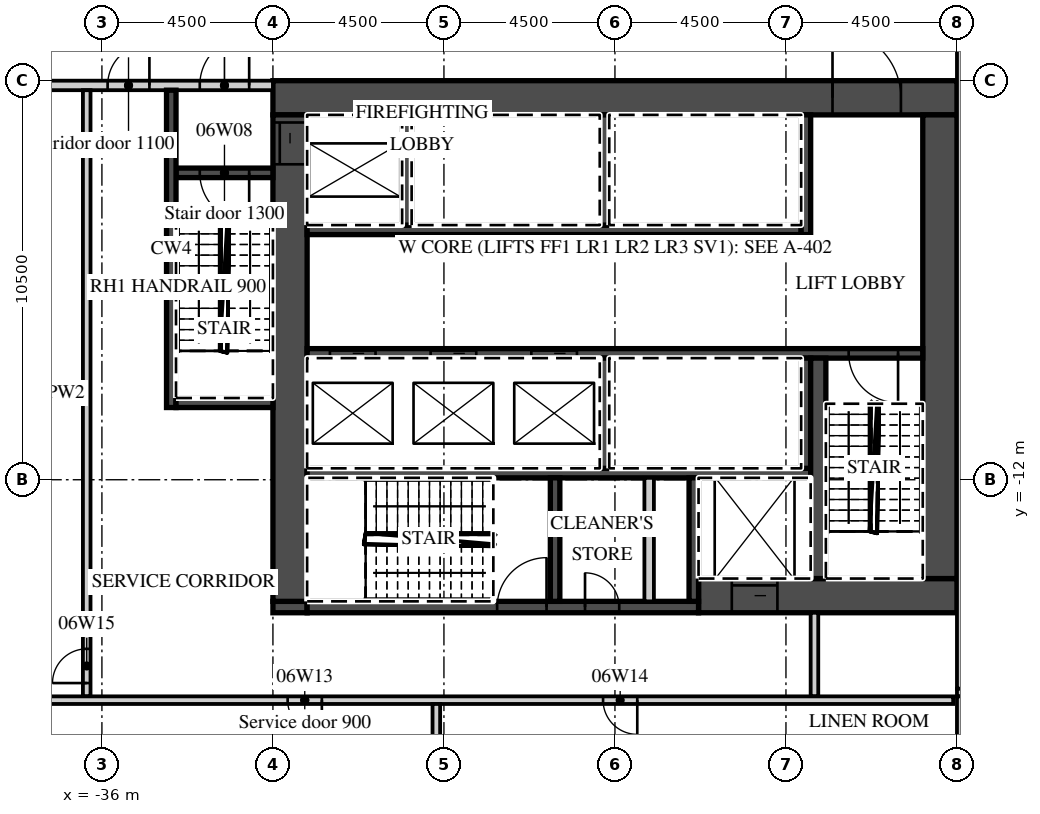
"""IFC4 building model, lengths in metres.
Left out: names, types, materials, properties, quantities, classifications, styles, units other than length and angle.
Written with IfcOpenShell. Run it as: python <this file> out.ifc"""

import sys

from ifc_helpers import new_model, si_unit, direction, frame, frame_2d, origin, place, context, subcontext, project, spatial, rectangle, extrude, element, fill, save


model = new_model("IFC4")
c1 = context("Model", 3, precision=1e-05, world=origin(), true_north=direction((0.0, 1.0)))
c2 = subcontext(c1, "Body", "Model", "MODEL_VIEW")
j1 = project(units=[si_unit("LENGTHUNIT", "METRE"), si_unit("PLANEANGLEUNIT", "RADIAN")], contexts=[c1])
p1 = place(None, origin())
s1 = spatial("IfcSite", under=j1, at=p1, CompositionType="ELEMENT")
p2 = place(p1, origin())
s2 = spatial("IfcBuilding", under=s1, at=p2, CompositionType="ELEMENT")
p3 = place(p2, frame((0.0, 0.0, 38.0)))
s3 = spatial("IfcBuildingStorey", under=s2, at=p3, CompositionType="ELEMENT", Elevation=38.0)
p4 = place(p3, frame((-31.5, -1.95, 0.0), z_axis=(0.0, 0.0, 1.0), x_axis=(1.0, 0.0, 0.0)))
e1 = element("IfcWall", 1, at=p4, inside=s3, PredefinedType="SHEAR", context=c2, shape_type="SweptSolid", body=[
    extrude(rectangle(XDim=18.0, YDim=0.9, at=frame_2d((9.0, 0.0))), origin(), (0.0, 0.0, 1.0), 8.7),
])
p5 = place(p4, frame((14.725, 0.0, 0.0)))
e2 = element("IfcOpeningElement", 2, at=p5, cuts=e1, PredefinedType="OPENING", context=c2, shape_type="SweptSolid", body=[
    extrude(rectangle(XDim=1.8, YDim=2.1, at=frame_2d((0.9, 1.05))), frame((0.0, 0.46, 0.0), z_axis=(0.0, -1.0, 0.0), x_axis=(1.0, 0.0, 0.0)), (0.0, 0.0, 1.0), 0.92),
])
p6 = place(p3, frame((-20.3, -15.05, 0.0), z_axis=(0.0, 0.0, 1.0), x_axis=(1.0, 0.0, 0.0)))
e3 = element("IfcWall", 3, at=p6, inside=s3, PredefinedType="SHEAR", context=c2, shape_type="SweptSolid", body=[
    extrude(rectangle(XDim=6.8, YDim=0.9, at=frame_2d((3.4, 0.0))), origin(), (0.0, 0.0, 1.0), 8.7),
])
p7 = place(p6, frame((0.875, 0.0, 0.0)))
e4 = element("IfcOpeningElement", 4, at=p7, cuts=e3, PredefinedType="OPENING", context=c2, shape_type="SweptSolid", body=[
    extrude(rectangle(XDim=1.2, YDim=2.1, at=frame_2d((0.6, 1.05))), frame((0.0, 0.46, 0.0), z_axis=(0.0, -1.0, 0.0), x_axis=(1.0, 0.0, 0.0)), (0.0, 0.0, 1.0), 0.92),
])
p8 = place(p3, frame((-31.5, -15.35, 0.0), z_axis=(0.0, 0.0, 1.0), x_axis=(1.0, 0.0, 0.0)))
e5 = element("IfcWall", 5, at=p8, inside=s3, PredefinedType="SHEAR", context=c2, shape_type="SweptSolid", body=[
    extrude(rectangle(XDim=0.9, YDim=0.3, at=frame_2d((0.45, 0.0))), origin(), (0.0, 0.0, 1.0), 8.7),
])
p9 = place(p3, frame((-30.6, -15.35, 0.0), z_axis=(0.0, 0.0, 1.0), x_axis=(1.0, 0.0, 0.0)))
e6 = element("IfcWall", 6, at=p9, inside=s3, PredefinedType="SHEAR", context=c2, shape_type="SweptSolid", body=[
    extrude(rectangle(XDim=10.3, YDim=0.3, at=frame_2d((5.15, 0.0))), origin(), (0.0, 0.0, 1.0), 8.7),
])
p10 = place(p9, frame((5.0, 0.0, 0.0)))
e7 = element("IfcOpeningElement", 7, at=p10, cuts=e6, PredefinedType="OPENING", context=c2, shape_type="SweptSolid", body=[
    extrude(rectangle(XDim=1.3, YDim=2.1, at=frame_2d((0.65, 1.05))), frame((0.0, 0.16, 0.0), z_axis=(0.0, -1.0, 0.0), x_axis=(1.0, 0.0, 0.0)), (0.0, 0.0, 1.0), 0.32),
])
p11 = place(p9, frame((7.312, 0.0, 0.0)))
e8 = element("IfcOpeningElement", 8, at=p11, cuts=e6, PredefinedType="OPENING", context=c2, shape_type="SweptSolid", body=[
    extrude(rectangle(XDim=0.9, YDim=2.1, at=frame_2d((0.45, 1.05))), frame((0.0, 0.16, 0.0), z_axis=(0.0, -1.0, 0.0), x_axis=(1.0, 0.0, 0.0)), (0.0, 0.0, 1.0), 0.32),
])
p12 = place(p3, frame((-31.05, -15.2, 0.0), z_axis=(0.0, 0.0, 1.0), x_axis=(0.0, 1.0, 0.0)))
e9 = element("IfcWall", 9, at=p12, inside=s3, PredefinedType="SHEAR", context=c2, shape_type="SweptSolid", body=[
    extrude(rectangle(XDim=12.8, YDim=0.9, at=frame_2d((6.4, 0.0))), origin(), (0.0, 0.0, 1.0), 8.7),
])
p13 = place(p12, frame((11.5, 0.0, 0.0)))
e10 = element("IfcOpeningElement", 10, at=p13, cuts=e9, PredefinedType="OPENING", context=c2, shape_type="SweptSolid", body=[
    extrude(rectangle(XDim=1.1, YDim=2.1, at=frame_2d((0.55, 1.05))), frame((0.0, 0.46, 0.0), z_axis=(0.0, -1.0, 0.0), x_axis=(1.0, 0.0, 0.0)), (0.0, 0.0, 1.0), 0.92),
])
p14 = place(p3, frame((-13.95, -14.6, 0.0), z_axis=(0.0, 0.0, 1.0), x_axis=(0.0, 1.0, 0.0)))
e11 = element("IfcWall", 11, at=p14, inside=s3, PredefinedType="SHEAR", context=c2, shape_type="SweptSolid", body=[
    extrude(rectangle(XDim=12.2, YDim=0.9, at=frame_2d((6.1, 0.0))), origin(), (0.0, 0.0, 1.0), 8.7),
])
p15 = place(p3, frame((-30.6, -5.425, 0.0), z_axis=(0.0, 0.0, 1.0), x_axis=(1.0, 0.0, 0.0)))
e12 = element("IfcWall", 12, at=p15, inside=s3, PredefinedType="SHEAR", context=c2, shape_type="SweptSolid", body=[
    extrude(rectangle(XDim=13.0, YDim=0.25, at=frame_2d((6.5, 0.0))), origin(), (0.0, 0.0, 1.0), 8.7),
])
p16 = place(p3, frame((-17.475, -5.55, 0.0), z_axis=(0.0, 0.0, 1.0), x_axis=(0.0, 1.0, 0.0)))
e13 = element("IfcWall", 13, at=p16, inside=s3, PredefinedType="SHEAR", context=c2, shape_type="SweptSolid", body=[
    extrude(rectangle(XDim=3.15, YDim=0.25, at=frame_2d((1.575, 0.0))), origin(), (0.0, 0.0, 1.0), 8.7),
])
for number, where, z_axis, x_axis in (
    (14, (-27.975, -5.3, 0.0), (0.0, 0.0, 1.0), (0.0, 1.0, 0.0)),
    (15, (-22.775, -5.3, 0.0), (0.0, 0.0, 1.0), (0.0, 1.0, 0.0)),
):
    element("IfcWall", number, at=place(p3, frame(where, z_axis=z_axis, x_axis=x_axis)), inside=s3, PredefinedType="SHEAR", context=c2, shape_type="SweptSolid", body=[
        extrude(rectangle(XDim=2.9, YDim=0.25, at=frame_2d((1.45, 0.0))), origin(), (0.0, 0.0, 1.0), 8.7),
    ])
p17 = place(p3, frame((-30.6, -8.675, 0.0), z_axis=(0.0, 0.0, 1.0), x_axis=(1.0, 0.0, 0.0)))
e16 = element("IfcWall", 16, at=p17, inside=s3, PredefinedType="SHEAR", context=c2, shape_type="SweptSolid", body=[
    extrude(rectangle(XDim=16.2, YDim=0.25, at=frame_2d((8.1, 0.0))), origin(), (0.0, 0.0, 1.0), 8.7),
])
p18 = place(p17, frame((0.6, 0.0, 0.0)))
e17 = element("IfcOpeningElement", 17, at=p18, cuts=e16, PredefinedType="OPENING", context=c2, shape_type="SweptSolid", body=[
    extrude(rectangle(XDim=1.2, YDim=2.1, at=frame_2d((0.6, 1.05))), frame((0.0, 0.135, 0.0), z_axis=(0.0, -1.0, 0.0), x_axis=(1.0, 0.0, 0.0)), (0.0, 0.0, 1.0), 0.27),
])
p19 = place(p17, frame((3.25, 0.0, 0.0)))
e18 = element("IfcOpeningElement", 18, at=p19, cuts=e16, PredefinedType="OPENING", context=c2, shape_type="SweptSolid", body=[
    extrude(rectangle(XDim=1.2, YDim=2.1, at=frame_2d((0.6, 1.05))), frame((0.0, 0.135, 0.0), z_axis=(0.0, -1.0, 0.0), x_axis=(1.0, 0.0, 0.0)), (0.0, 0.0, 1.0), 0.27),
])
p20 = place(p17, frame((5.9, 0.0, 0.0)))
e19 = element("IfcOpeningElement", 19, at=p20, cuts=e16, PredefinedType="OPENING", context=c2, shape_type="SweptSolid", body=[
    extrude(rectangle(XDim=1.2, YDim=2.1, at=frame_2d((0.6, 1.05))), frame((0.0, 0.135, 0.0), z_axis=(0.0, -1.0, 0.0), x_axis=(1.0, 0.0, 0.0)), (0.0, 0.0, 1.0), 0.27),
])
p21 = place(p17, frame((14.25, 0.0, 0.0)))
e20 = element("IfcOpeningElement", 20, at=p21, cuts=e16, PredefinedType="OPENING", context=c2, shape_type="SweptSolid", body=[
    extrude(rectangle(XDim=1.3, YDim=2.1, at=frame_2d((0.65, 1.05))), frame((0.0, 0.135, 0.0), z_axis=(0.0, -1.0, 0.0), x_axis=(1.0, 0.0, 0.0)), (0.0, 0.0, 1.0), 0.27),
])
p22 = place(p3, frame((-30.6, -11.825, 0.0), z_axis=(0.0, 0.0, 1.0), x_axis=(1.0, 0.0, 0.0)))
e21 = element("IfcWall", 21, at=p22, inside=s3, PredefinedType="SHEAR", context=c2, shape_type="SweptSolid", body=[
    extrude(rectangle(XDim=13.25, YDim=0.25, at=frame_2d((6.625, 0.0))), origin(), (0.0, 0.0, 1.0), 8.7),
])
for number, where, z_axis, x_axis in (
    (22, (-17.475, -11.7, 0.0), (0.0, 0.0, 1.0), (0.0, 1.0, 0.0)),
    (23, (-22.775, -11.7, 0.0), (0.0, 0.0, 1.0), (0.0, 1.0, 0.0)),
):
    element("IfcWall", number, at=place(p3, frame(where, z_axis=z_axis, x_axis=x_axis)), inside=s3, PredefinedType="SHEAR", context=c2, shape_type="SweptSolid", body=[
        extrude(rectangle(XDim=2.9, YDim=0.25, at=frame_2d((1.45, 0.0))), origin(), (0.0, 0.0, 1.0), 8.7),
    ])
p23 = place(p3, frame((-17.15, -14.6, 0.0), z_axis=(0.0, 0.0, 1.0), x_axis=(0.0, 1.0, 0.0)))
e24 = element("IfcWall", 24, at=p23, inside=s3, PredefinedType="SHEAR", context=c2, shape_type="SweptSolid", body=[
    extrude(rectangle(XDim=5.8, YDim=0.4, at=frame_2d((2.9, 0.0))), origin(), (0.0, 0.0, 1.0), 8.7),
])
for number, where, z_axis, x_axis in (
    (25, (-20.425, -15.2, 0.0), (0.0, 0.0, 1.0), (0.0, 1.0, 0.0)),
    (26, (-24.075, -15.2, 0.0), (0.0, 0.0, 1.0), (0.0, 1.0, 0.0)),
):
    element("IfcWall", number, at=place(p3, frame(where, z_axis=z_axis, x_axis=x_axis)), inside=s3, PredefinedType="SHEAR", context=c2, shape_type="SweptSolid", body=[
        extrude(rectangle(XDim=3.25, YDim=0.25, at=frame_2d((1.625, 0.0))), origin(), (0.0, 0.0, 1.0), 8.7),
    ])
p24 = place(p3, frame((-21.6, -15.2, 0.0), z_axis=(0.0, 0.0, 1.0), x_axis=(0.0, 1.0, 0.0)))
e27 = element("IfcWall", 27, at=p24, inside=s3, PredefinedType="PARTITIONING", context=c2, shape_type="SweptSolid", body=[
    extrude(rectangle(XDim=3.25, YDim=0.25, at=frame_2d((1.625, 0.0))), origin(), (0.0, 0.0, 1.0), 8.7),
])
p25 = place(p3, frame((-44.85, -1.625, 0.0), z_axis=(0.0, 0.0, 1.0), x_axis=(1.0, 0.0, 0.0)))
e28 = element("IfcWall", 28, at=p25, inside=s3, PredefinedType="PARTITIONING", context=c2, shape_type="SweptSolid", body=[
    extrude(rectangle(XDim=13.35, YDim=0.25, at=frame_2d((6.675, 0.0))), origin(), (0.0, 0.0, 1.0), 8.7),
])
p26 = place(p25, frame((11.425, 0.0, 0.0)))
e29 = element("IfcOpeningElement", 29, at=p26, cuts=e28, PredefinedType="OPENING", context=c2, shape_type="SweptSolid", body=[
    extrude(rectangle(XDim=1.3, YDim=2.1, at=frame_2d((0.65, 1.05))), frame((0.0, 0.135, 0.0), z_axis=(0.0, -1.0, 0.0), x_axis=(1.0, 0.0, 0.0)), (0.0, 0.0, 1.0), 0.27),
])
p27 = place(p25, frame((9.0, 0.0, 0.0)))
e30 = element("IfcOpeningElement", 30, at=p27, cuts=e28, PredefinedType="OPENING", context=c2, shape_type="SweptSolid", body=[
    extrude(rectangle(XDim=1.1, YDim=2.1, at=frame_2d((0.55, 1.05))), frame((0.0, 0.135, 0.0), z_axis=(0.0, -1.0, 0.0), x_axis=(1.0, 0.0, 0.0)), (0.0, 0.0, 1.0), 0.27),
])
p28 = place(p3, frame((-34.05, -3.925, 0.0), z_axis=(0.0, 0.0, 1.0), x_axis=(1.0, 0.0, 0.0)))
e31 = element("IfcWall", 31, at=p28, inside=s3, PredefinedType="SHEAR", context=c2, shape_type="SweptSolid", body=[
    extrude(rectangle(XDim=2.55, YDim=0.25, at=frame_2d((1.275, 0.0))), origin(), (0.0, 0.0, 1.0), 8.7),
])
p29 = place(p28, frame((0.625, 0.0, 0.0)))
e32 = element("IfcOpeningElement", 32, at=p29, cuts=e31, PredefinedType="OPENING", context=c2, shape_type="SweptSolid", body=[
    extrude(rectangle(XDim=1.3, YDim=2.1, at=frame_2d((0.65, 1.05))), frame((0.0, 0.135, 0.0), z_axis=(0.0, -1.0, 0.0), x_axis=(1.0, 0.0, 0.0)), (0.0, 0.0, 1.0), 0.27),
])
p30 = place(p3, frame((-34.175, -10.1, 0.0), z_axis=(0.0, 0.0, 1.0), x_axis=(0.0, 1.0, 0.0)))
e33 = element("IfcWall", 33, at=p30, inside=s3, PredefinedType="SHEAR", context=c2, shape_type="SweptSolid", body=[
    extrude(rectangle(XDim=8.35, YDim=0.25, at=frame_2d((4.175, 0.0))), origin(), (0.0, 0.0, 1.0), 8.7),
])
p31 = place(p3, frame((-34.05, -9.975, 0.0), z_axis=(0.0, 0.0, 1.0), x_axis=(1.0, 0.0, 0.0)))
e34 = element("IfcWall", 34, at=p31, inside=s3, PredefinedType="SHEAR", context=c2, shape_type="SweptSolid", body=[
    extrude(rectangle(XDim=2.55, YDim=0.25, at=frame_2d((1.275, 0.0))), origin(), (0.0, 0.0, 1.0), 8.7),
])
p32 = place(p3, frame((-17.25, -17.7, 0.0), z_axis=(0.0, 0.0, 1.0), x_axis=(0.0, 1.0, 0.0)))
e35 = element("IfcWall", 35, at=p32, inside=s3, PredefinedType="PARTITIONING", context=c2, shape_type="SweptSolid", body=[
    extrude(rectangle(XDim=2.2, YDim=0.2, at=frame_2d((1.1, 0.0))), origin(), (0.0, 0.0, 1.0), 8.7),
])
p33 = place(p3, frame((-36.4, -17.7, 0.0), z_axis=(0.0, 0.0, 1.0), x_axis=(0.0, 1.0, 0.0)))
e36 = element("IfcWall", 36, at=p33, inside=s3, PredefinedType="PARTITIONING", context=c2, shape_type="SweptSolid", body=[
    extrude(rectangle(XDim=15.95, YDim=0.2, at=frame_2d((7.975, 0.0))), origin(), (0.0, 0.0, 1.0), 8.7),
])
p34 = place(p33, frame((0.35, 0.0, 0.0)))
e37 = element("IfcOpeningElement", 37, at=p34, cuts=e36, PredefinedType="OPENING", context=c2, shape_type="SweptSolid", body=[
    extrude(rectangle(XDim=0.9, YDim=2.1, at=frame_2d((0.45, 1.05))), frame((0.0, 0.11, 0.0), z_axis=(0.0, -1.0, 0.0), x_axis=(1.0, 0.0, 0.0)), (0.0, 0.0, 1.0), 0.22),
])
p35 = place(p3, frame((-44.55, -17.8, 0.0), z_axis=(0.0, 0.0, 1.0), x_axis=(1.0, 0.0, 0.0)))
e38 = element("IfcWall", 38, at=p35, inside=s3, PredefinedType="PARTITIONING", context=c2, shape_type="SweptSolid", body=[
    extrude(rectangle(XDim=30.95, YDim=0.2, at=frame_2d((15.475, 0.0))), origin(), (0.0, 0.0, 1.0), 8.7),
])
p36 = place(p35, frame((13.438, 0.0, 0.0)))
e39 = element("IfcOpeningElement", 39, at=p36, cuts=e38, PredefinedType="OPENING", context=c2, shape_type="SweptSolid", body=[
    extrude(rectangle(XDim=0.9, YDim=2.1, at=frame_2d((0.45, 1.05))), frame((0.0, 0.11, 0.0), z_axis=(0.0, -1.0, 0.0), x_axis=(1.0, 0.0, 0.0)), (0.0, 0.0, 1.0), 0.22),
])
p37 = place(p35, frame((21.738, 0.0, 0.0)))
e40 = element("IfcOpeningElement", 40, at=p37, cuts=e38, PredefinedType="OPENING", context=c2, shape_type="SweptSolid", body=[
    extrude(rectangle(XDim=0.9, YDim=2.1, at=frame_2d((0.45, 1.05))), frame((0.0, 0.11, 0.0), z_axis=(0.0, -1.0, 0.0), x_axis=(1.0, 0.0, 0.0)), (0.0, 0.0, 1.0), 0.22),
])
p38 = place(p3, frame((-27.2, -21.55, 0.0), z_axis=(0.0, 0.0, 1.0), x_axis=(0.0, 1.0, 0.0)))
e41 = element("IfcWall", 41, at=p38, inside=s3, PredefinedType="PARTITIONING", context=c2, shape_type="SweptSolid", body=[
    extrude(rectangle(XDim=3.65, YDim=0.2, at=frame_2d((1.825, 0.0))), origin(), (0.0, 0.0, 1.0), 8.7),
])
p39 = place(p3, frame((-13.4, -17.5, 0.0), z_axis=(0.0, 0.0, 1.0), x_axis=(0.0, 1.0, 0.0)))
e42 = element("IfcWall", 42, at=p39, inside=s3, PredefinedType="PARTITIONING", context=c2, shape_type="SweptSolid", body=[
    extrude(rectangle(XDim=35.0, YDim=0.2, at=frame_2d((17.5, 0.0))), origin(), (0.0, 0.0, 1.0), 8.7),
])
p40 = place(p39, frame((22.6, 0.0, 0.0)))
e43 = element("IfcOpeningElement", 43, at=p40, cuts=e42, PredefinedType="OPENING", context=c2, shape_type="SweptSolid", body=[
    extrude(rectangle(XDim=1.8, YDim=2.1, at=frame_2d((0.9, 1.05))), frame((0.0, 0.11, 0.0), z_axis=(0.0, -1.0, 0.0), x_axis=(1.0, 0.0, 0.0)), (0.0, 0.0, 1.0), 0.22),
])
p41 = place(p39, frame((28.6, 0.0, 0.0)))
e44 = element("IfcOpeningElement", 44, at=p41, cuts=e42, PredefinedType="OPENING", context=c2, shape_type="SweptSolid", body=[
    extrude(rectangle(XDim=1.8, YDim=2.1, at=frame_2d((0.9, 1.05))), frame((0.0, 0.11, 0.0), z_axis=(0.0, -1.0, 0.0), x_axis=(1.0, 0.0, 0.0)), (0.0, 0.0, 1.0), 0.22),
])
p42 = place(p3, frame((-13.5, -17.6, 0.0), z_axis=(0.0, 0.0, 1.0), x_axis=(1.0, 0.0, 0.0)))
e45 = element("IfcWall", 45, at=p42, inside=s3, PredefinedType="PARTITIONING", context=c2, shape_type="SweptSolid", body=[
    extrude(rectangle(XDim=27.0, YDim=0.2, at=frame_2d((13.5, 0.0))), origin(), (0.0, 0.0, 1.0), 8.7),
])
p43 = place(p42, frame((4.6, 0.0, 0.0)))
e46 = element("IfcOpeningElement", 46, at=p43, cuts=e45, PredefinedType="OPENING", context=c2, shape_type="SweptSolid", body=[
    extrude(rectangle(XDim=1.8, YDim=2.1, at=frame_2d((0.9, 1.05))), frame((0.0, 0.11, 0.0), z_axis=(0.0, -1.0, 0.0), x_axis=(1.0, 0.0, 0.0)), (0.0, 0.0, 1.0), 0.22),
])
p44 = place(p42, frame((12.6, 0.0, 0.0)))
e47 = element("IfcOpeningElement", 47, at=p44, cuts=e45, PredefinedType="OPENING", context=c2, shape_type="SweptSolid", body=[
    extrude(rectangle(XDim=1.8, YDim=2.1, at=frame_2d((0.9, 1.05))), frame((0.0, 0.11, 0.0), z_axis=(0.0, -1.0, 0.0), x_axis=(1.0, 0.0, 0.0)), (0.0, 0.0, 1.0), 0.22),
])
p45 = place(p42, frame((20.6, 0.0, 0.0)))
e48 = element("IfcOpeningElement", 48, at=p45, cuts=e45, PredefinedType="OPENING", context=c2, shape_type="SweptSolid", body=[
    extrude(rectangle(XDim=1.8, YDim=2.1, at=frame_2d((0.9, 1.05))), frame((0.0, 0.11, 0.0), z_axis=(0.0, -1.0, 0.0), x_axis=(1.0, 0.0, 0.0)), (0.0, 0.0, 1.0), 0.22),
])
p46 = place(p3, frame((-13.4, -21.55, 0.0), z_axis=(0.0, 0.0, 1.0), x_axis=(0.0, 1.0, 0.0)))
e49 = element("IfcWall", 49, at=p46, inside=s3, PredefinedType="PARTITIONING", context=c2, shape_type="SweptSolid", body=[
    extrude(rectangle(XDim=3.85, YDim=0.2, at=frame_2d((1.925, 0.0))), origin(), (0.0, 0.0, 1.0), 8.7),
])
p47 = place(p18, origin())
e50 = element("IfcDoor", 50, at=p47, inside=s3, OperationType="SLIDING_TO_LEFT", PredefinedType="DOOR", context=c2, shape_type="SweptSolid", body=[
    extrude(rectangle(XDim=1.2, YDim=2.1, at=frame_2d((0.6, 1.05))), frame((0.0, 0.025, 0.0), z_axis=(0.0, -1.0, 0.0), x_axis=(1.0, 0.0, 0.0)), (0.0, 0.0, 1.0), 0.05),
])
fill(e17, e50)
p48 = place(p19, origin())
e51 = element("IfcDoor", 51, at=p48, inside=s3, OperationType="SLIDING_TO_RIGHT", PredefinedType="DOOR", context=c2, shape_type="SweptSolid", body=[
    extrude(rectangle(XDim=1.2, YDim=2.1, at=frame_2d((0.6, 1.05))), frame((0.0, 0.025, 0.0), z_axis=(0.0, -1.0, 0.0), x_axis=(1.0, 0.0, 0.0)), (0.0, 0.0, 1.0), 0.05),
])
fill(e18, e51)
p49 = place(p20, origin())
e52 = element("IfcDoor", 52, at=p49, inside=s3, OperationType="SLIDING_TO_RIGHT", PredefinedType="DOOR", context=c2, shape_type="SweptSolid", body=[
    extrude(rectangle(XDim=1.2, YDim=2.1, at=frame_2d((0.6, 1.05))), frame((0.0, 0.025, 0.0), z_axis=(0.0, -1.0, 0.0), x_axis=(1.0, 0.0, 0.0)), (0.0, 0.0, 1.0), 0.05),
])
fill(e19, e52)
p50 = place(p7, origin())
e53 = element("IfcDoor", 53, at=p50, inside=s3, OperationType="SLIDING_TO_LEFT", PredefinedType="DOOR", context=c2, shape_type="SweptSolid", body=[
    extrude(rectangle(XDim=1.2, YDim=2.1, at=frame_2d((0.6, 1.05))), frame((0.0, 0.025, 0.0), z_axis=(0.0, -1.0, 0.0), x_axis=(1.0, 0.0, 0.0)), (0.0, 0.0, 1.0), 0.05),
])
fill(e4, e53)
p51 = place(p13, origin())
e54 = element("IfcDoor", 54, at=p51, inside=s3, OperationType="SLIDING_TO_RIGHT", PredefinedType="DOOR", context=c2, shape_type="SweptSolid", body=[
    extrude(rectangle(XDim=1.1, YDim=2.1, at=frame_2d((0.55, 1.05))), frame((0.0, 0.025, 0.0), z_axis=(0.0, -1.0, 0.0), x_axis=(1.0, 0.0, 0.0)), (0.0, 0.0, 1.0), 0.05),
])
fill(e10, e54)
p52 = place(p5, origin())
e55 = element("IfcDoor", 55, at=p52, inside=s3, OperationType="DOUBLE_DOOR_DOUBLE_SWING", PredefinedType="DOOR", context=c2, shape_type="SweptSolid", body=[
    extrude(rectangle(XDim=1.8, YDim=2.1, at=frame_2d((0.9, 1.05))), frame((0.0, 0.025, 0.0), z_axis=(0.0, -1.0, 0.0), x_axis=(1.0, 0.0, 0.0)), (0.0, 0.0, 1.0), 0.05),
])
fill(e2, e55)
p53 = place(p26, origin())
e56 = element("IfcDoor", 56, at=p53, inside=s3, OperationType="SINGLE_SWING_RIGHT", PredefinedType="DOOR", context=c2, shape_type="SweptSolid", body=[
    extrude(rectangle(XDim=1.3, YDim=2.1, at=frame_2d((0.65, 1.05))), frame((0.0, 0.025, 0.0), z_axis=(0.0, -1.0, 0.0), x_axis=(1.0, 0.0, 0.0)), (0.0, 0.0, 1.0), 0.05),
])
fill(e29, e56)
p54 = place(p29, origin())
e57 = element("IfcDoor", 57, at=p54, inside=s3, OperationType="SINGLE_SWING_RIGHT", PredefinedType="DOOR", context=c2, shape_type="SweptSolid", body=[
    extrude(rectangle(XDim=1.3, YDim=2.1, at=frame_2d((0.65, 1.05))), frame((0.0, 0.025, 0.0), z_axis=(0.0, -1.0, 0.0), x_axis=(1.0, 0.0, 0.0)), (0.0, 0.0, 1.0), 0.05),
])
fill(e32, e57)
p55 = place(p27, origin())
e58 = element("IfcDoor", 58, at=p55, inside=s3, OperationType="SINGLE_SWING_RIGHT", PredefinedType="DOOR", context=c2, shape_type="SweptSolid", body=[
    extrude(rectangle(XDim=1.1, YDim=2.1, at=frame_2d((0.55, 1.05))), frame((0.0, 0.025, 0.0), z_axis=(0.0, -1.0, 0.0), x_axis=(1.0, 0.0, 0.0)), (0.0, 0.0, 1.0), 0.05),
])
fill(e30, e58)
p56 = place(p21, origin())
e59 = element("IfcDoor", 59, at=p56, inside=s3, OperationType="SINGLE_SWING_RIGHT", PredefinedType="DOOR", context=c2, shape_type="SweptSolid", body=[
    extrude(rectangle(XDim=1.3, YDim=2.1, at=frame_2d((0.65, 1.05))), frame((0.0, 0.025, 0.0), z_axis=(0.0, -1.0, 0.0), x_axis=(1.0, 0.0, 0.0)), (0.0, 0.0, 1.0), 0.05),
])
fill(e20, e59)
p57 = place(p10, origin())
e60 = element("IfcDoor", 60, at=p57, inside=s3, OperationType="SINGLE_SWING_RIGHT", PredefinedType="DOOR", context=c2, shape_type="SweptSolid", body=[
    extrude(rectangle(XDim=1.3, YDim=2.1, at=frame_2d((0.65, 1.05))), frame((0.0, 0.025, 0.0), z_axis=(0.0, -1.0, 0.0), x_axis=(1.0, 0.0, 0.0)), (0.0, 0.0, 1.0), 0.05),
])
fill(e7, e60)
p58 = place(p11, origin())
e61 = element("IfcDoor", 61, at=p58, inside=s3, OperationType="SINGLE_SWING_LEFT", PredefinedType="DOOR", context=c2, shape_type="SweptSolid", body=[
    extrude(rectangle(XDim=0.9, YDim=2.1, at=frame_2d((0.45, 1.05))), frame((0.0, 0.025, 0.0), z_axis=(0.0, -1.0, 0.0), x_axis=(1.0, 0.0, 0.0)), (0.0, 0.0, 1.0), 0.05),
])
fill(e8, e61)
p59 = place(p36, origin())
e62 = element("IfcDoor", 62, at=p59, inside=s3, OperationType="SINGLE_SWING_RIGHT", PredefinedType="DOOR", context=c2, shape_type="SweptSolid", body=[
    extrude(rectangle(XDim=0.9, YDim=2.1, at=frame_2d((0.45, 1.05))), frame((0.0, 0.025, 0.0), z_axis=(0.0, -1.0, 0.0), x_axis=(1.0, 0.0, 0.0)), (0.0, 0.0, 1.0), 0.05),
])
fill(e39, e62)
p60 = place(p37, origin())
e63 = element("IfcDoor", 63, at=p60, inside=s3, OperationType="SINGLE_SWING_RIGHT", PredefinedType="DOOR", context=c2, shape_type="SweptSolid", body=[
    extrude(rectangle(XDim=0.9, YDim=2.1, at=frame_2d((0.45, 1.05))), frame((0.0, 0.025, 0.0), z_axis=(0.0, -1.0, 0.0), x_axis=(1.0, 0.0, 0.0)), (0.0, 0.0, 1.0), 0.05),
])
fill(e40, e63)
p61 = place(p34, origin())
e64 = element("IfcDoor", 64, at=p61, inside=s3, OperationType="SINGLE_SWING_LEFT", PredefinedType="DOOR", context=c2, shape_type="SweptSolid", body=[
    extrude(rectangle(XDim=0.9, YDim=2.1, at=frame_2d((0.45, 1.05))), frame((0.0, 0.025, 0.0), z_axis=(0.0, -1.0, 0.0), x_axis=(1.0, 0.0, 0.0)), (0.0, 0.0, 1.0), 0.05),
])
fill(e37, e64)
save(model, sys.argv[1])
